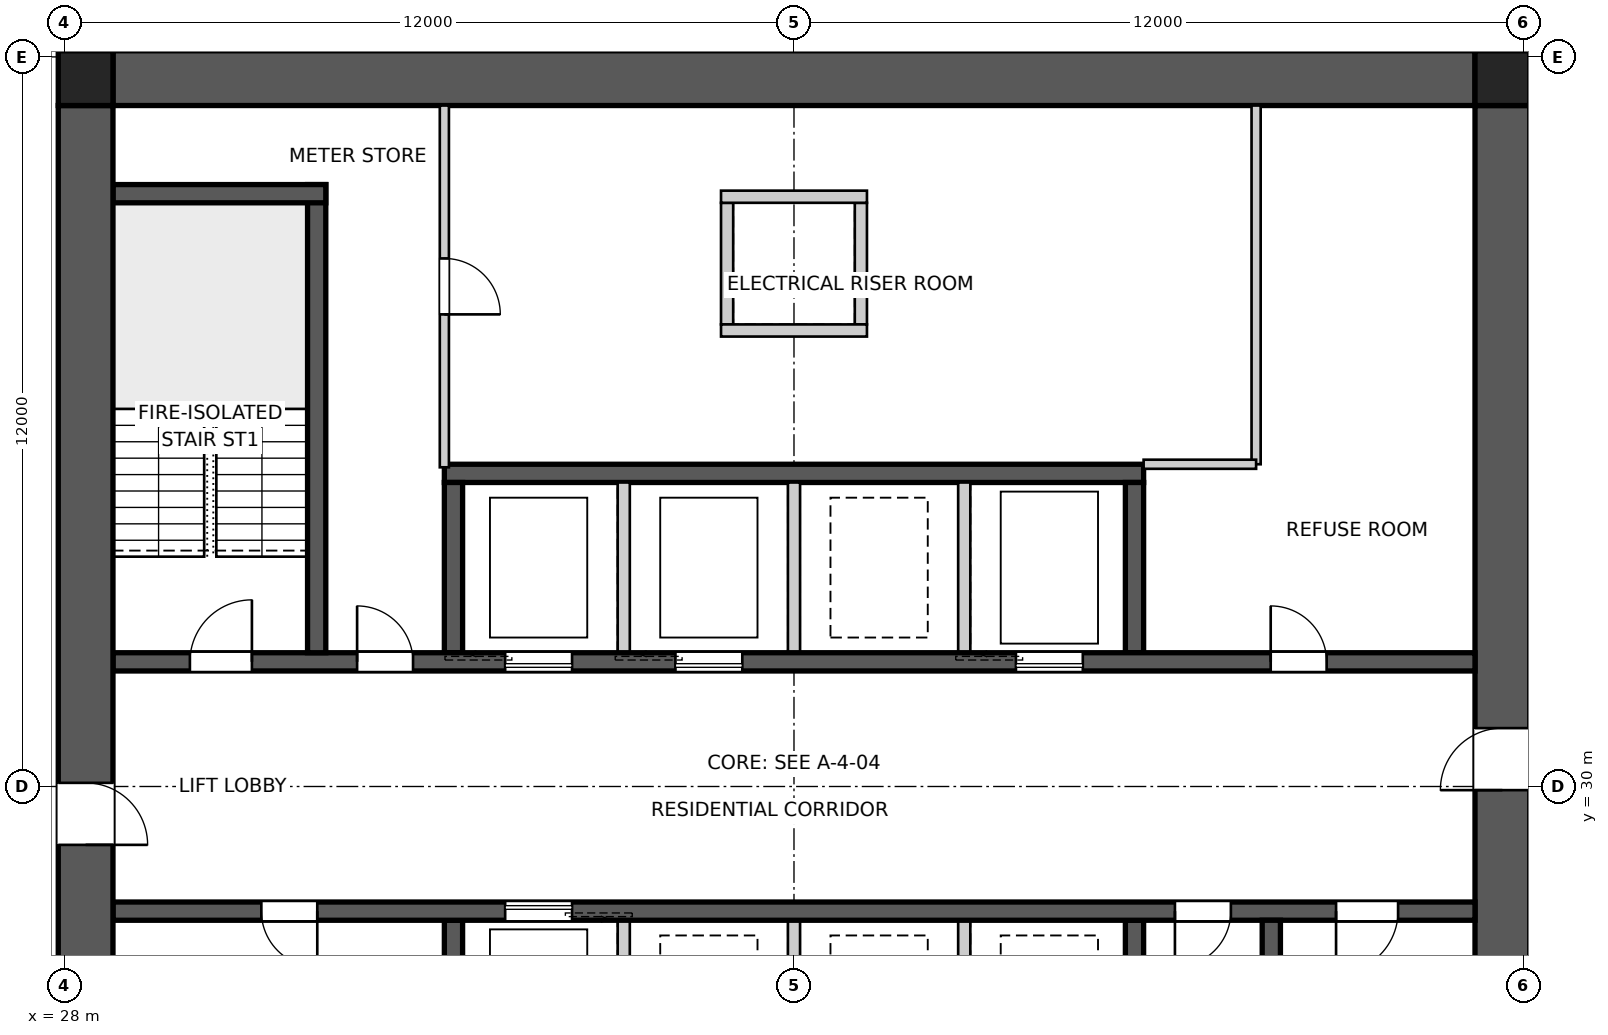
"""IFC4 building model, lengths in metres.
Left out: names, types, materials, properties, quantities, classifications, styles, units other than length and angle.
Written with IfcOpenShell. Run it as: python <this file> out.ifc"""

import sys

from ifc_helpers import new_model, si_unit, direction, frame, frame_2d, origin, origin_2d, place, context, subcontext, project, spatial, polyline, rectangle, outline, extrude, element, fill, save


model = new_model("IFC4")
c1 = context("Model", 3, precision=1e-05, world=origin(), true_north=direction((0.0, 1.0)))
c2 = subcontext(c1, "Body", "Model", "MODEL_VIEW")
j1 = project(units=[si_unit("LENGTHUNIT", "METRE"), si_unit("PLANEANGLEUNIT", "RADIAN")], contexts=[c1])
p1 = place(None, origin())
s1 = spatial("IfcSite", under=j1, at=p1, CompositionType="ELEMENT")
p2 = place(p1, origin())
s2 = spatial("IfcBuilding", under=s1, at=p2, CompositionType="ELEMENT")
p3 = place(p2, frame((0.0, 0.0, 50.6)))
s3 = spatial("IfcBuildingStorey", under=s2, at=p3, CompositionType="ELEMENT", Elevation=50.6)
p4 = place(p3, frame((28.8, 41.65, 0.0), z_axis=(0.0, 0.0, 1.0), x_axis=(1.0, 0.0, 0.0)))
e1 = element("IfcWall", 1, at=p4, inside=s3, PredefinedType="SHEAR", context=c2, shape_type="SweptSolid", body=[
    extrude(outline(polyline([(0.0, -0.45), (22.4, -0.45), (22.4, -0.025), (22.85, -0.025), (22.85, 0.025), (22.4, 0.025), (22.4, 0.45), (0.0, 0.45), (0.0, 0.025), (-0.45, 0.025), (-0.45, -0.025), (0.0, -0.025), (0.0, -0.45)])), origin(), (0.0, 0.0, 1.0), 3.4),
])
p5 = place(p3, frame((51.65, 18.8, 0.0), z_axis=(0.0, 0.0, 1.0), x_axis=(0.0, 1.0, 0.0)))
e2 = element("IfcWall", 2, at=p5, inside=s3, PredefinedType="SHEAR", context=c2, shape_type="SweptSolid", body=[
    extrude(outline(polyline([(0.0, -0.45), (22.4, -0.45), (22.4, -0.025), (22.85, -0.025), (22.85, 0.025), (22.4, 0.025), (22.4, 0.45), (0.0, 0.45), (0.0, 0.025), (-0.45, 0.025), (-0.45, -0.025), (0.0, -0.025), (0.0, -0.45)])), origin(), (0.0, 0.0, 1.0), 3.4),
])
p6 = place(p5, frame((11.14, 0.0, 0.0)))
e3 = element("IfcOpeningElement", 3, at=p6, cuts=e2, PredefinedType="OPENING", context=c2, shape_type="SweptSolid", body=[
    extrude(rectangle(XDim=1.02, YDim=2.4, at=frame_2d((0.51, 1.2))), frame((0.0, 0.46, 0.0), z_axis=(0.0, -1.0, 0.0), x_axis=(1.0, 0.0, 0.0)), (0.0, 0.0, 1.0), 0.92),
])
p7 = place(p3, frame((28.35, 41.2, 0.0), z_axis=(0.0, 0.0, 1.0), x_axis=(0.0, -1.0, 0.0)))
e4 = element("IfcWall", 4, at=p7, inside=s3, PredefinedType="SHEAR", context=c2, shape_type="SweptSolid", body=[
    extrude(outline(polyline([(0.0, -0.45), (22.4, -0.45), (22.4, -0.025), (22.85, -0.025), (22.85, 0.025), (22.4, 0.025), (22.4, 0.45), (0.0, 0.45), (0.0, 0.025), (-0.45, 0.025), (-0.45, -0.025), (0.0, -0.025), (0.0, -0.45)])), origin(), (0.0, 0.0, 1.0), 3.4),
])
p8 = place(p7, frame((11.14, 0.0, 0.0)))
e5 = element("IfcOpeningElement", 5, at=p8, cuts=e4, PredefinedType="OPENING", context=c2, shape_type="SweptSolid", body=[
    extrude(rectangle(XDim=1.02, YDim=2.4, at=frame_2d((0.51, 1.2))), frame((0.0, 0.46, 0.0), z_axis=(0.0, -1.0, 0.0), x_axis=(1.0, 0.0, 0.0)), (0.0, 0.0, 1.0), 0.92),
])
p9 = place(p3, frame((28.8, 32.05, 0.0), z_axis=(0.0, 0.0, 1.0), x_axis=(1.0, 0.0, 0.0)))
e6 = element("IfcWall", 6, at=p9, inside=s3, PredefinedType="SHEAR", context=c2, shape_type="SweptSolid", body=[
    extrude(rectangle(XDim=22.4, YDim=0.3, at=frame_2d((11.2, 0.0))), origin(), (0.0, 0.0, 1.0), 3.4),
])
p10 = place(p9, frame((19.04, 0.0, 0.0)))
e7 = element("IfcOpeningElement", 7, at=p10, cuts=e6, PredefinedType="OPENING", context=c2, shape_type="SweptSolid", body=[
    extrude(rectangle(XDim=0.92, YDim=2.1, at=frame_2d((0.46, 1.05))), frame((0.0, 0.16, 0.0), z_axis=(0.0, -1.0, 0.0), x_axis=(1.0, 0.0, 0.0)), (0.0, 0.0, 1.0), 0.32),
])
p11 = place(p9, frame((1.265, 0.0, 0.0)))
e8 = element("IfcOpeningElement", 8, at=p11, cuts=e6, PredefinedType="OPENING", context=c2, shape_type="SweptSolid", body=[
    extrude(rectangle(XDim=1.02, YDim=2.1, at=frame_2d((0.51, 1.05))), frame((0.0, 0.16, 0.0), z_axis=(0.0, -1.0, 0.0), x_axis=(1.0, 0.0, 0.0)), (0.0, 0.0, 1.0), 0.32),
])
p12 = place(p9, frame((4.015, 0.0, 0.0)))
e9 = element("IfcOpeningElement", 9, at=p12, cuts=e6, PredefinedType="OPENING", context=c2, shape_type="SweptSolid", body=[
    extrude(rectangle(XDim=0.92, YDim=2.1, at=frame_2d((0.46, 1.05))), frame((0.0, 0.16, 0.0), z_axis=(0.0, -1.0, 0.0), x_axis=(1.0, 0.0, 0.0)), (0.0, 0.0, 1.0), 0.32),
])
p13 = place(p9, frame((6.45, 0.0, 0.0)))
e10 = element("IfcOpeningElement", 10, at=p13, cuts=e6, PredefinedType="OPENING", context=c2, shape_type="SweptSolid", body=[
    extrude(rectangle(XDim=1.1, YDim=2.1, at=frame_2d((0.55, 1.05))), frame((0.0, 0.16, 0.0), z_axis=(0.0, -1.0, 0.0), x_axis=(1.0, 0.0, 0.0)), (0.0, 0.0, 1.0), 0.32),
])
p14 = place(p9, frame((9.25, 0.0, 0.0)))
e11 = element("IfcOpeningElement", 11, at=p14, cuts=e6, PredefinedType="OPENING", context=c2, shape_type="SweptSolid", body=[
    extrude(rectangle(XDim=1.1, YDim=2.1, at=frame_2d((0.55, 1.05))), frame((0.0, 0.16, 0.0), z_axis=(0.0, -1.0, 0.0), x_axis=(1.0, 0.0, 0.0)), (0.0, 0.0, 1.0), 0.32),
])
p15 = place(p9, frame((14.85, 0.0, 0.0)))
e12 = element("IfcOpeningElement", 12, at=p15, cuts=e6, PredefinedType="OPENING", context=c2, shape_type="SweptSolid", body=[
    extrude(rectangle(XDim=1.1, YDim=2.1, at=frame_2d((0.55, 1.05))), frame((0.0, 0.16, 0.0), z_axis=(0.0, -1.0, 0.0), x_axis=(1.0, 0.0, 0.0)), (0.0, 0.0, 1.0), 0.32),
])
p16 = place(p3, frame((51.2, 27.95, 0.0), z_axis=(0.0, 0.0, 1.0), x_axis=(-1.0, 0.0, 0.0)))
e13 = element("IfcWall", 13, at=p16, inside=s3, PredefinedType="SHEAR", context=c2, shape_type="SweptSolid", body=[
    extrude(rectangle(XDim=22.4, YDim=0.3, at=frame_2d((11.2, 0.0))), origin(), (0.0, 0.0, 1.0), 3.4),
])
p17 = place(p16, frame((19.04, 0.0, 0.0)))
e14 = element("IfcOpeningElement", 14, at=p17, cuts=e13, PredefinedType="OPENING", context=c2, shape_type="SweptSolid", body=[
    extrude(rectangle(XDim=0.92, YDim=2.1, at=frame_2d((0.46, 1.05))), frame((0.0, 0.16, 0.0), z_axis=(0.0, -1.0, 0.0), x_axis=(1.0, 0.0, 0.0)), (0.0, 0.0, 1.0), 0.32),
])
p18 = place(p16, frame((1.265, 0.0, 0.0)))
e15 = element("IfcOpeningElement", 15, at=p18, cuts=e13, PredefinedType="OPENING", context=c2, shape_type="SweptSolid", body=[
    extrude(rectangle(XDim=1.02, YDim=2.1, at=frame_2d((0.51, 1.05))), frame((0.0, 0.16, 0.0), z_axis=(0.0, -1.0, 0.0), x_axis=(1.0, 0.0, 0.0)), (0.0, 0.0, 1.0), 0.32),
])
p19 = place(p16, frame((4.015, 0.0, 0.0)))
e16 = element("IfcOpeningElement", 16, at=p19, cuts=e13, PredefinedType="OPENING", context=c2, shape_type="SweptSolid", body=[
    extrude(rectangle(XDim=0.92, YDim=2.1, at=frame_2d((0.46, 1.05))), frame((0.0, 0.16, 0.0), z_axis=(0.0, -1.0, 0.0), x_axis=(1.0, 0.0, 0.0)), (0.0, 0.0, 1.0), 0.32),
])
p20 = place(p16, frame((14.85, 0.0, 0.0)))
e17 = element("IfcOpeningElement", 17, at=p20, cuts=e13, PredefinedType="OPENING", context=c2, shape_type="SweptSolid", body=[
    extrude(rectangle(XDim=1.1, YDim=2.1, at=frame_2d((0.55, 1.05))), frame((0.0, 0.16, 0.0), z_axis=(0.0, -1.0, 0.0), x_axis=(1.0, 0.0, 0.0)), (0.0, 0.0, 1.0), 0.32),
])
p21 = place(p3, frame((34.25, 35.15, 0.0), z_axis=(0.0, 0.0, 1.0), x_axis=(1.0, 0.0, 0.0)))
e18 = element("IfcWall", 18, at=p21, inside=s3, PredefinedType="SHEAR", context=c2, shape_type="SweptSolid", body=[
    extrude(rectangle(XDim=11.5, YDim=0.3, at=frame_2d((5.75, 0.0))), origin(), (0.0, 0.0, 1.0), 3.4),
])
for number, where, z_axis, x_axis in (
    (19, (34.4, 32.2, 0.0), (0.0, 0.0, 1.0), (0.0, 1.0, 0.0)),
    (20, (45.6, 27.8, 0.0), (0.0, 0.0, 1.0), (0.0, -1.0, 0.0)),
):
    element("IfcWall", number, at=place(p3, frame(where, z_axis=z_axis, x_axis=x_axis)), inside=s3, PredefinedType="SHEAR", context=c2, shape_type="SweptSolid", body=[
        extrude(rectangle(XDim=2.8, YDim=0.3, at=frame_2d((1.4, 0.0))), origin(), (0.0, 0.0, 1.0), 3.4),
    ])
for number, where, z_axis, x_axis in (
    (21, (37.2, 32.2, 0.0), (0.0, 0.0, 1.0), (0.0, 1.0, 0.0)),
    (22, (42.8, 27.8, 0.0), (0.0, 0.0, 1.0), (0.0, -1.0, 0.0)),
    (23, (40.0, 32.2, 0.0), (0.0, 0.0, 1.0), (0.0, 1.0, 0.0)),
    (24, (40.0, 27.8, 0.0), (0.0, 0.0, 1.0), (0.0, -1.0, 0.0)),
    (25, (42.8, 32.2, 0.0), (0.0, 0.0, 1.0), (0.0, 1.0, 0.0)),
    (26, (37.2, 27.8, 0.0), (0.0, 0.0, 1.0), (0.0, -1.0, 0.0)),
):
    element("IfcWall", number, at=place(p3, frame(where, z_axis=z_axis, x_axis=x_axis)), inside=s3, PredefinedType="SOLIDWALL", context=c2, shape_type="SweptSolid", body=[
        extrude(rectangle(XDim=2.8, YDim=0.2, at=frame_2d((1.4, 0.0))), origin(), (0.0, 0.0, 1.0), 3.4),
    ])
for number, where, z_axis, x_axis in (
    (27, (45.6, 32.2, 0.0), (0.0, 0.0, 1.0), (0.0, 1.0, 0.0)),
    (28, (34.4, 27.8, 0.0), (0.0, 0.0, 1.0), (0.0, -1.0, 0.0)),
):
    element("IfcWall", number, at=place(p3, frame(where, z_axis=z_axis, x_axis=x_axis)), inside=s3, PredefinedType="SHEAR", context=c2, shape_type="SweptSolid", body=[
        extrude(rectangle(XDim=2.8, YDim=0.3, at=frame_2d((1.4, 0.0))), origin(), (0.0, 0.0, 1.0), 3.4),
    ])
p22 = place(p3, frame((32.15, 32.2, 0.0), z_axis=(0.0, 0.0, 1.0), x_axis=(0.0, 1.0, 0.0)))
e29 = element("IfcWall", 29, at=p22, inside=s3, PredefinedType="SHEAR", context=c2, shape_type="SweptSolid", body=[
    extrude(rectangle(XDim=7.7, YDim=0.3, at=frame_2d((3.85, 0.0))), origin(), (0.0, 0.0, 1.0), 3.4),
])
p23 = place(p3, frame((28.8, 39.75, 0.0), z_axis=(0.0, 0.0, 1.0), x_axis=(1.0, 0.0, 0.0)))
e30 = element("IfcWall", 30, at=p23, inside=s3, PredefinedType="SHEAR", context=c2, shape_type="SweptSolid", body=[
    extrude(rectangle(XDim=3.5, YDim=0.3, at=frame_2d((1.75, 0.0))), origin(), (0.0, 0.0, 1.0), 3.4),
])
p24 = place(p3, frame((47.85, 27.8, 0.0), z_axis=(0.0, 0.0, 1.0), x_axis=(0.0, -1.0, 0.0)))
e31 = element("IfcWall", 31, at=p24, inside=s3, PredefinedType="SHEAR", context=c2, shape_type="SweptSolid", body=[
    extrude(rectangle(XDim=7.7, YDim=0.3, at=frame_2d((3.85, 0.0))), origin(), (0.0, 0.0, 1.0), 3.4),
])
for number, where, z_axis, x_axis in (
    (32, (38.9, 37.6, 0.0), (0.0, 0.0, 1.0), (0.0, 1.0, 0.0)),
    (33, (41.1, 37.6, 0.0), (0.0, 0.0, 1.0), (0.0, 1.0, 0.0)),
):
    element("IfcWall", number, at=place(p3, frame(where, z_axis=z_axis, x_axis=x_axis)), inside=s3, PredefinedType="SOLIDWALL", context=c2, shape_type="SweptSolid", body=[
        extrude(rectangle(XDim=2.0, YDim=0.2, at=frame_2d((1.0, 0.0))), origin(), (0.0, 0.0, 1.0), 3.4),
    ])
for number, where, z_axis, x_axis in (
    (34, (38.8, 37.5, 0.0), (0.0, 0.0, 1.0), (1.0, 0.0, 0.0)),
    (35, (38.8, 39.7, 0.0), (0.0, 0.0, 1.0), (1.0, 0.0, 0.0)),
):
    element("IfcWall", number, at=place(p3, frame(where, z_axis=z_axis, x_axis=x_axis)), inside=s3, PredefinedType="SOLIDWALL", context=c2, shape_type="SweptSolid", body=[
        extrude(rectangle(XDim=2.4, YDim=0.2, at=frame_2d((1.2, 0.0))), origin(), (0.0, 0.0, 1.0), 3.4),
    ])
for number, where, z_axis, x_axis in (
    (36, (51.65, 41.65, 0.0), (0.0, 0.0, 1.0), (1.0, 0.0, 0.0)),
    (37, (28.35, 41.65, 0.0), (0.0, 0.0, 1.0), (1.0, 0.0, 0.0)),
):
    element("IfcColumn", number, at=place(p3, frame(where, z_axis=z_axis, x_axis=x_axis)), inside=s3, PredefinedType="COLUMN", context=c2, shape_type="SweptSolid", body=[
        extrude(rectangle(XDim=0.9, YDim=0.9, at=origin_2d()), origin(), (0.0, 0.0, 1.0), 3.4),
    ])
p25 = place(p3, frame((34.25, 41.2, 0.0), z_axis=(0.0, 0.0, 1.0), x_axis=(0.0, -1.0, 0.0)))
e38 = element("IfcWall", 38, at=p25, inside=s3, PredefinedType="SOLIDWALL", context=c2, shape_type="SweptSolid", body=[
    extrude(rectangle(XDim=5.95, YDim=0.15, at=frame_2d((2.975, 0.0))), origin(), (0.0, 0.0, 1.0), 3.25),
])
p26 = place(p25, frame((2.515, 0.0, 0.0)))
e39 = element("IfcOpeningElement", 39, at=p26, cuts=e38, PredefinedType="OPENING", context=c2, shape_type="SweptSolid", body=[
    extrude(rectangle(XDim=0.92, YDim=2.1, at=frame_2d((0.46, 1.05))), frame((0.0, 0.085, 0.0), z_axis=(0.0, -1.0, 0.0), x_axis=(1.0, 0.0, 0.0)), (0.0, 0.0, 1.0), 0.17),
])
p27 = place(p3, frame((47.6, 41.2, 0.0), z_axis=(0.0, 0.0, 1.0), x_axis=(0.0, -1.0, 0.0)))
e40 = element("IfcWall", 40, at=p27, inside=s3, PredefinedType="SOLIDWALL", context=c2, shape_type="SweptSolid", body=[
    extrude(rectangle(XDim=5.9, YDim=0.15, at=frame_2d((2.95, 0.0))), origin(), (0.0, 0.0, 1.0), 3.25),
])
p28 = place(p3, frame((47.6, 35.3, 0.0), z_axis=(0.0, 0.0, 1.0), x_axis=(-1.0, 0.0, 0.0)))
e41 = element("IfcWall", 41, at=p28, inside=s3, PredefinedType="SOLIDWALL", context=c2, shape_type="SweptSolid", body=[
    extrude(rectangle(XDim=1.85, YDim=0.15, at=frame_2d((0.925, 0.0))), origin(), (0.0, 0.0, 1.0), 3.25),
])
p29 = place(p10, origin())
e42 = element("IfcDoor", 42, at=p29, inside=s3, OperationType="SINGLE_SWING_LEFT", PredefinedType="DOOR", context=c2, shape_type="SweptSolid", body=[
    extrude(rectangle(XDim=0.92, YDim=2.1, at=frame_2d((0.46, 1.05))), frame((0.0, 0.025, 0.0), z_axis=(0.0, -1.0, 0.0), x_axis=(1.0, 0.0, 0.0)), (0.0, 0.0, 1.0), 0.05),
])
fill(e7, e42)
p30 = place(p17, origin())
e43 = element("IfcDoor", 43, at=p30, inside=s3, OperationType="SINGLE_SWING_LEFT", PredefinedType="DOOR", context=c2, shape_type="SweptSolid", body=[
    extrude(rectangle(XDim=0.92, YDim=2.1, at=frame_2d((0.46, 1.05))), frame((0.0, 0.025, 0.0), z_axis=(0.0, -1.0, 0.0), x_axis=(1.0, 0.0, 0.0)), (0.0, 0.0, 1.0), 0.05),
])
fill(e14, e43)
p31 = place(p18, origin())
e44 = element("IfcDoor", 44, at=p31, inside=s3, OperationType="SINGLE_SWING_RIGHT", PredefinedType="DOOR", context=c2, shape_type="SweptSolid", body=[
    extrude(rectangle(XDim=1.02, YDim=2.1, at=frame_2d((0.51, 1.05))), frame((0.0, 0.025, 0.0), z_axis=(0.0, -1.0, 0.0), x_axis=(1.0, 0.0, 0.0)), (0.0, 0.0, 1.0), 0.05),
])
fill(e15, e44)
p32 = place(p11, origin())
e45 = element("IfcDoor", 45, at=p32, inside=s3, OperationType="SINGLE_SWING_RIGHT", PredefinedType="DOOR", context=c2, shape_type="SweptSolid", body=[
    extrude(rectangle(XDim=1.02, YDim=2.1, at=frame_2d((0.51, 1.05))), frame((0.0, 0.025, 0.0), z_axis=(0.0, -1.0, 0.0), x_axis=(1.0, 0.0, 0.0)), (0.0, 0.0, 1.0), 0.05),
])
fill(e8, e45)
p33 = place(p12, origin())
e46 = element("IfcDoor", 46, at=p33, inside=s3, OperationType="SINGLE_SWING_LEFT", PredefinedType="DOOR", context=c2, shape_type="SweptSolid", body=[
    extrude(rectangle(XDim=0.92, YDim=2.1, at=frame_2d((0.46, 1.05))), frame((0.0, 0.025, 0.0), z_axis=(0.0, -1.0, 0.0), x_axis=(1.0, 0.0, 0.0)), (0.0, 0.0, 1.0), 0.05),
])
fill(e9, e46)
p34 = place(p19, origin())
e47 = element("IfcDoor", 47, at=p34, inside=s3, OperationType="SINGLE_SWING_RIGHT", PredefinedType="DOOR", context=c2, shape_type="SweptSolid", body=[
    extrude(rectangle(XDim=0.92, YDim=2.1, at=frame_2d((0.46, 1.05))), frame((0.0, 0.025, 0.0), z_axis=(0.0, -1.0, 0.0), x_axis=(1.0, 0.0, 0.0)), (0.0, 0.0, 1.0), 0.05),
])
fill(e16, e47)
p35 = place(p26, origin())
e48 = element("IfcDoor", 48, at=p35, inside=s3, OperationType="SINGLE_SWING_RIGHT", PredefinedType="DOOR", context=c2, shape_type="SweptSolid", body=[
    extrude(rectangle(XDim=0.92, YDim=2.1, at=frame_2d((0.46, 1.05))), frame((0.0, 0.025, 0.0), z_axis=(0.0, -1.0, 0.0), x_axis=(1.0, 0.0, 0.0)), (0.0, 0.0, 1.0), 0.05),
])
fill(e39, e48)
p36 = place(p6, origin())
e49 = element("IfcDoor", 49, at=p36, inside=s3, OperationType="SINGLE_SWING_LEFT", PredefinedType="DOOR", context=c2, shape_type="SweptSolid", body=[
    extrude(rectangle(XDim=1.02, YDim=2.4, at=frame_2d((0.51, 1.2))), frame((0.0, 0.025, 0.0), z_axis=(0.0, -1.0, 0.0), x_axis=(1.0, 0.0, 0.0)), (0.0, 0.0, 1.0), 0.05),
])
fill(e3, e49)
p37 = place(p8, origin())
e50 = element("IfcDoor", 50, at=p37, inside=s3, OperationType="SINGLE_SWING_RIGHT", PredefinedType="DOOR", context=c2, shape_type="SweptSolid", body=[
    extrude(rectangle(XDim=1.02, YDim=2.4, at=frame_2d((0.51, 1.2))), frame((0.0, 0.025, 0.0), z_axis=(0.0, -1.0, 0.0), x_axis=(1.0, 0.0, 0.0)), (0.0, 0.0, 1.0), 0.05),
])
fill(e5, e50)
p38 = place(p13, origin())
e51 = element("IfcDoor", 51, at=p38, inside=s3, OperationType="SLIDING_TO_LEFT", PredefinedType="DOOR", context=c2, shape_type="SweptSolid", body=[
    extrude(rectangle(XDim=1.1, YDim=2.1, at=frame_2d((0.55, 1.05))), frame((0.0, 0.025, 0.0), z_axis=(0.0, -1.0, 0.0), x_axis=(1.0, 0.0, 0.0)), (0.0, 0.0, 1.0), 0.05),
])
fill(e10, e51)
p39 = place(p14, origin())
e52 = element("IfcDoor", 52, at=p39, inside=s3, OperationType="SLIDING_TO_LEFT", PredefinedType="DOOR", context=c2, shape_type="SweptSolid", body=[
    extrude(rectangle(XDim=1.1, YDim=2.1, at=frame_2d((0.55, 1.05))), frame((0.0, 0.025, 0.0), z_axis=(0.0, -1.0, 0.0), x_axis=(1.0, 0.0, 0.0)), (0.0, 0.0, 1.0), 0.05),
])
fill(e11, e52)
p40 = place(p15, origin())
e53 = element("IfcDoor", 53, at=p40, inside=s3, OperationType="SLIDING_TO_LEFT", PredefinedType="DOOR", context=c2, shape_type="SweptSolid", body=[
    extrude(rectangle(XDim=1.1, YDim=2.1, at=frame_2d((0.55, 1.05))), frame((0.0, 0.025, 0.0), z_axis=(0.0, -1.0, 0.0), x_axis=(1.0, 0.0, 0.0)), (0.0, 0.0, 1.0), 0.05),
])
fill(e12, e53)
p41 = place(p20, origin())
e54 = element("IfcDoor", 54, at=p41, inside=s3, OperationType="SLIDING_TO_LEFT", PredefinedType="DOOR", context=c2, shape_type="SweptSolid", body=[
    extrude(rectangle(XDim=1.1, YDim=2.1, at=frame_2d((0.55, 1.05))), frame((0.0, 0.025, 0.0), z_axis=(0.0, -1.0, 0.0), x_axis=(1.0, 0.0, 0.0)), (0.0, 0.0, 1.0), 0.05),
])
fill(e17, e54)
save(model, sys.argv[1])
